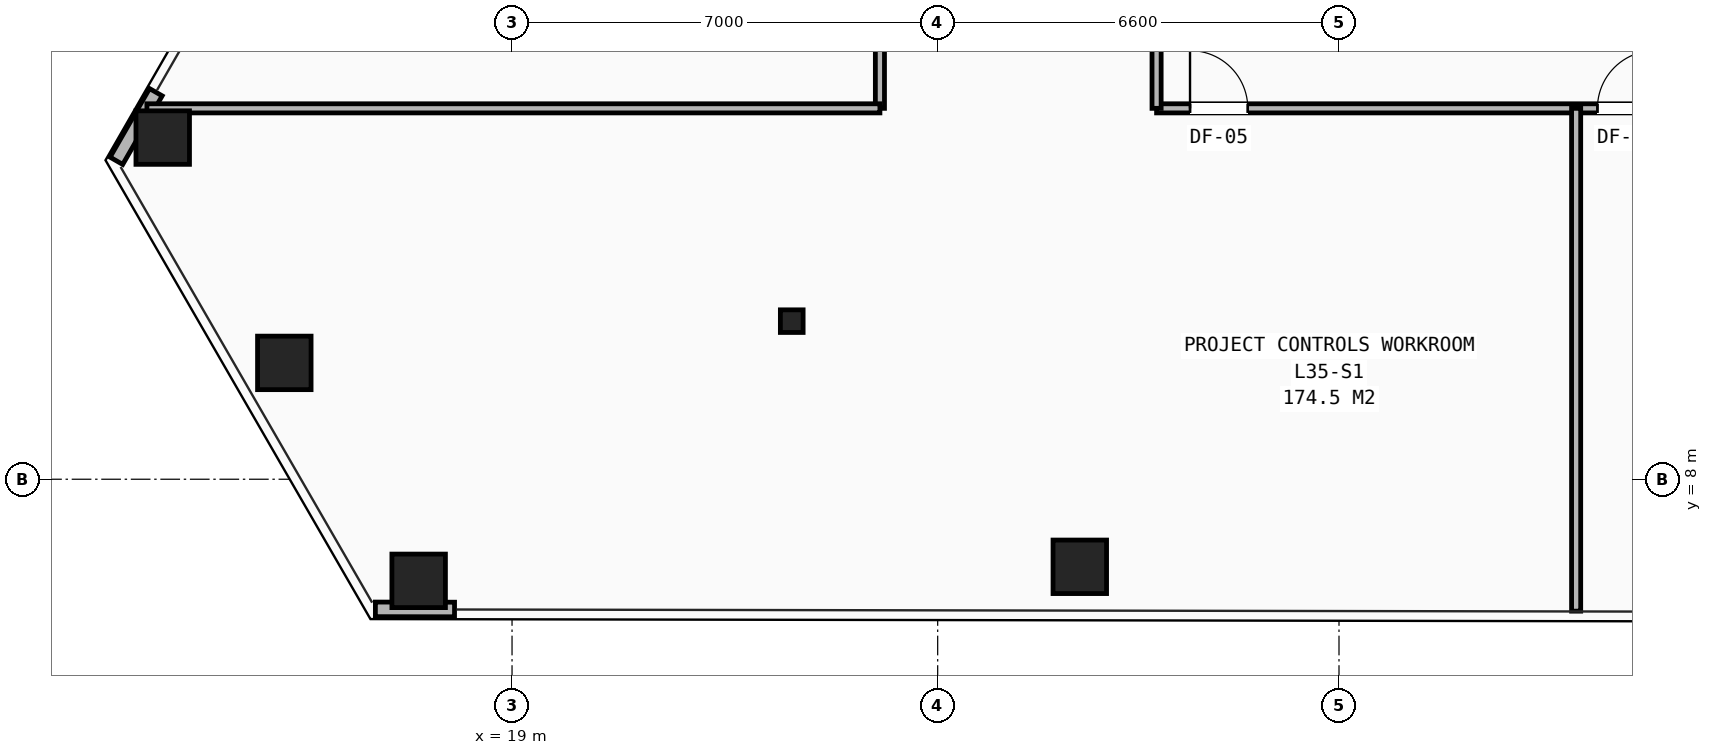
"""IFC4 building model, lengths in metres.
Left out: names, types, materials, properties, quantities, classifications, styles, units other than length and angle.
Written with IfcOpenShell. Run it as: python <this file> out.ifc"""

import sys

from ifc_helpers import new_model, si_unit, direction, frame, frame_2d, origin, origin_2d, place, context, subcontext, project, spatial, rectangle, hollow_rectangle, i_section, extrude, element, fill, save


model = new_model("IFC4")
c1 = context("Model", 3, precision=1e-05, world=origin(), true_north=direction((0.0, 1.0)))
c2 = subcontext(c1, "Body", "Model", "MODEL_VIEW")
j1 = project(units=[si_unit("LENGTHUNIT", "METRE"), si_unit("PLANEANGLEUNIT", "RADIAN")], contexts=[c1])
p1 = place(None, origin())
s1 = spatial("IfcSite", under=j1, at=p1, CompositionType="ELEMENT")
p2 = place(p1, origin())
s2 = spatial("IfcBuilding", under=s1, at=p2, CompositionType="ELEMENT")
p3 = place(p2, frame((0.0, 0.0, 122.9)))
s3 = spatial("IfcBuildingStorey", under=s2, at=p3, CompositionType="ELEMENT", Elevation=122.9)
p4 = place(p3, frame((23.6, 10.6, 0.0), z_axis=(0.0, 0.0, 1.0), x_axis=(1.0, 0.0, 0.0)))
e1 = element("IfcColumn", 1, at=p4, inside=s3, PredefinedType="COLUMN", context=c2, shape_type="SweptSolid", body=[
    extrude(i_section(OverallWidth=0.374, OverallDepth=0.372, WebThickness=0.016, FlangeThickness=0.026, at=origin_2d()), origin(), (0.0, 0.0, 1.0), 3.45),
])
for number, where, z_axis, x_axis in (
    (2, (13.255, 13.619, 0.0), (0.0, 0.0, 1.0), (1.0, 0.0, 0.0)),
    (3, (15.255, 9.913, 0.0), (0.0, 0.0, 1.0), (1.0, 0.0, 0.0)),
    (4, (17.464, 6.329, 0.0), (0.0, 0.0, 1.0), (1.0, 0.0, 0.0)),
    (5, (28.337, 6.56, 0.0), (0.0, 0.0, 1.0), (1.0, 0.0, 0.0)),
):
    element("IfcColumn", number, at=place(p3, frame(where, z_axis=z_axis, x_axis=x_axis)), inside=s3, PredefinedType="COLUMN", context=c2, shape_type="SweptSolid", body=[
        extrude(hollow_rectangle(XDim=0.88, YDim=0.88, WallThickness=0.06, at=origin_2d()), origin(), (0.0, 0.0, 1.0), 3.45),
    ])
p5 = place(p3, frame((13.142, 14.365, 0.0), z_axis=(0.0, 0.0, 1.0), x_axis=(-0.498460550087, -0.86691238312, 0.0)))
e6 = element("IfcWall", 6, at=p5, inside=s3, PredefinedType="SHEAR", context=c2, shape_type="SweptSolid", body=[
    extrude(rectangle(XDim=1.301, YDim=0.24, at=frame_2d((0.651, 0.0))), origin(), (0.0, 0.0, 1.0), 2.583),
])
p6 = place(p3, frame((16.753, 5.86, 0.0), z_axis=(0.0, 0.0, 1.0), x_axis=(0.999998574928, -0.001688236199, 0.0)))
e7 = element("IfcWall", 7, at=p6, inside=s3, PredefinedType="SHEAR", context=c2, shape_type="SweptSolid", body=[
    extrude(rectangle(XDim=1.302, YDim=0.24, at=frame_2d((0.651, 0.0))), origin(), (0.0, 0.0, 1.0), 2.583),
])
p7 = place(p3, frame((29.6, 14.1, 0.0), z_axis=(0.0, 0.0, 1.0), x_axis=(1.0, 0.0, 0.0)))
e8 = element("IfcWall", 8, at=p7, inside=s3, PredefinedType="PARTITIONING", context=c2, shape_type="SweptSolid", body=[
    extrude(rectangle(XDim=18.6, YDim=0.15, at=frame_2d((9.3, 0.0))), origin(), (0.0, 0.0, 1.0), 2.252),
])
p8 = place(p7, frame((0.55, 0.0, 0.0)))
e9 = element("IfcOpeningElement", 9, at=p8, cuts=e8, PredefinedType="OPENING", context=c2, shape_type="SweptSolid", body=[
    extrude(rectangle(XDim=0.95, YDim=2.1, at=frame_2d((0.475, 1.05))), frame((0.0, 0.085, 0.0), z_axis=(0.0, -1.0, 0.0), x_axis=(1.0, 0.0, 0.0)), (0.0, 0.0, 1.0), 0.17),
])
p9 = place(p7, frame((7.25, 0.0, 0.0)))
e10 = element("IfcOpeningElement", 10, at=p9, cuts=e8, PredefinedType="OPENING", context=c2, shape_type="SweptSolid", body=[
    extrude(rectangle(XDim=0.95, YDim=2.1, at=frame_2d((0.475, 1.05))), frame((0.0, 0.085, 0.0), z_axis=(0.0, -1.0, 0.0), x_axis=(1.0, 0.0, 0.0)), (0.0, 0.0, 1.0), 0.17),
])
p10 = place(p7, frame((13.75, 0.0, 0.0)))
e11 = element("IfcOpeningElement", 11, at=p10, cuts=e8, PredefinedType="OPENING", context=c2, shape_type="SweptSolid", body=[
    extrude(rectangle(XDim=0.95, YDim=2.1, at=frame_2d((0.475, 1.05))), frame((0.0, 0.085, 0.0), z_axis=(0.0, -1.0, 0.0), x_axis=(1.0, 0.0, 0.0)), (0.0, 0.0, 1.0), 0.17),
])
p11 = place(p3, frame((29.6, 14.1, 0.0), z_axis=(0.0, 0.0, 1.0), x_axis=(0.0, 1.0, 0.0)))
e12 = element("IfcWall", 12, at=p11, inside=s3, PredefinedType="PARTITIONING", context=c2, shape_type="SweptSolid", body=[
    extrude(rectangle(XDim=8.7, YDim=0.15, at=frame_2d((4.35, 0.0))), origin(), (0.0, 0.0, 1.0), 3.21),
])
p12 = place(p11, frame((2.65, 0.0, 0.0)))
e13 = element("IfcOpeningElement", 13, at=p12, cuts=e12, PredefinedType="OPENING", context=c2, shape_type="SweptSolid", body=[
    extrude(rectangle(XDim=0.85, YDim=2.05, at=frame_2d((0.425, 1.025))), frame((0.0, 0.085, 0.0), z_axis=(0.0, -1.0, 0.0), x_axis=(1.0, 0.0, 0.0)), (0.0, 0.0, 1.0), 0.17),
])
p13 = place(p11, frame((4.75, 0.0, 0.0)))
e14 = element("IfcOpeningElement", 14, at=p13, cuts=e12, PredefinedType="OPENING", context=c2, shape_type="SweptSolid", body=[
    extrude(rectangle(XDim=0.85, YDim=2.05, at=frame_2d((0.425, 1.025))), frame((0.0, 0.085, 0.0), z_axis=(0.0, -1.0, 0.0), x_axis=(1.0, 0.0, 0.0)), (0.0, 0.0, 1.0), 0.17),
])
p14 = place(p11, frame((6.85, 0.0, 0.0)))
e15 = element("IfcOpeningElement", 15, at=p14, cuts=e12, PredefinedType="OPENING", context=c2, shape_type="SweptSolid", body=[
    extrude(rectangle(XDim=0.85, YDim=2.05, at=frame_2d((0.425, 1.025))), frame((0.0, 0.085, 0.0), z_axis=(0.0, -1.0, 0.0), x_axis=(1.0, 0.0, 0.0)), (0.0, 0.0, 1.0), 0.17),
])
p15 = place(p3, frame((25.05, 14.1, 0.0), z_axis=(0.0, 0.0, 1.0), x_axis=(0.0, 1.0, 0.0)))
e16 = element("IfcWall", 16, at=p15, inside=s3, PredefinedType="PARTITIONING", context=c2, shape_type="SweptSolid", body=[
    extrude(rectangle(XDim=8.7, YDim=0.15, at=frame_2d((4.35, 0.0))), origin(), (0.0, 0.0, 1.0), 3.21),
])
p16 = place(p3, frame((36.5, 5.83, 0.0), z_axis=(0.0, 0.0, 1.0), x_axis=(0.0, 1.0, 0.0)))
e17 = element("IfcWall", 17, at=p16, inside=s3, PredefinedType="PARTITIONING", context=c2, shape_type="SweptSolid", body=[
    extrude(rectangle(XDim=8.27, YDim=0.15, at=frame_2d((4.135, 0.0))), origin(), (0.0, 0.0, 1.0), 2.252),
])
p17 = place(p3, frame((12.995, 14.1, 0.0), z_axis=(0.0, 0.0, 1.0), x_axis=(1.0, 0.0, 0.0)))
e18 = element("IfcWall", 18, at=p17, inside=s3, PredefinedType="PARTITIONING", context=c2, shape_type="SweptSolid", body=[
    extrude(rectangle(XDim=12.055, YDim=0.15, at=frame_2d((6.027, 0.0))), origin(), (0.0, 0.0, 1.0), 2.589),
])
p18 = place(p8, origin())
e19 = element("IfcDoor", 19, at=p18, inside=s3, OperationType="SINGLE_SWING_LEFT", PredefinedType="DOOR", context=c2, shape_type="SweptSolid", body=[
    extrude(rectangle(XDim=0.95, YDim=2.1, at=frame_2d((0.475, 1.05))), frame((0.0, 0.025, 0.0), z_axis=(0.0, -1.0, 0.0), x_axis=(1.0, 0.0, 0.0)), (0.0, 0.0, 1.0), 0.05),
])
fill(e9, e19)
p19 = place(p9, origin())
e20 = element("IfcDoor", 20, at=p19, inside=s3, OperationType="SINGLE_SWING_RIGHT", PredefinedType="DOOR", context=c2, shape_type="SweptSolid", body=[
    extrude(rectangle(XDim=0.95, YDim=2.1, at=frame_2d((0.475, 1.05))), frame((0.0, 0.025, 0.0), z_axis=(0.0, -1.0, 0.0), x_axis=(1.0, 0.0, 0.0)), (0.0, 0.0, 1.0), 0.05),
])
fill(e10, e20)
save(model, sys.argv[1])
